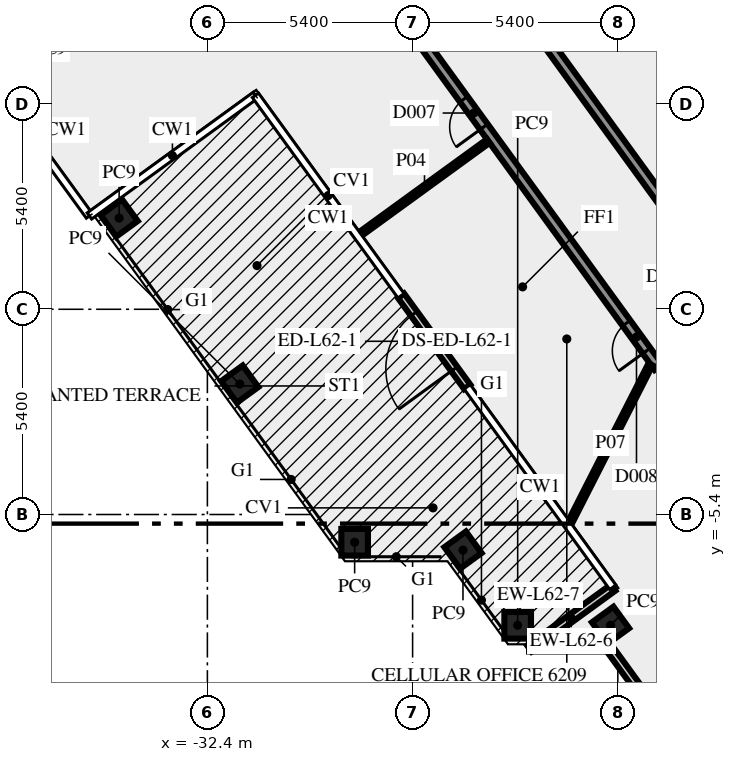
"""IFC4 building model, lengths in metres.
Left out: names, types, materials, properties, quantities, classifications, styles, units other than length and angle.
Written with IfcOpenShell. Run it as: python <this file> out.ifc"""

import sys

from ifc_helpers import new_model, si_unit, direction, frame, frame_2d, origin, origin_2d, place, context, subcontext, project, spatial, rectangle, extrude, element, fill, save


model = new_model("IFC4")
c1 = context("Model", 3, precision=1e-05, world=origin(), true_north=direction((0.0, 1.0)))
c2 = subcontext(c1, "Body", "Model", "MODEL_VIEW")
j1 = project(units=[si_unit("LENGTHUNIT", "METRE"), si_unit("PLANEANGLEUNIT", "RADIAN")], contexts=[c1])
p1 = place(None, origin())
s1 = spatial("IfcSite", under=j1, at=p1, CompositionType="ELEMENT")
p2 = place(p1, origin())
s2 = spatial("IfcBuilding", under=s1, at=p2, CompositionType="ELEMENT")
p3 = place(p2, frame((0.0, 0.0, 265.0)))
s3 = spatial("IfcBuildingStorey", under=s2, at=p3, CompositionType="ELEMENT", Elevation=265.0)
for number, where, z_axis, x_axis in (
    (1, (-34.722, 2.4, 0.0), (0.0, 0.0, 1.0), (0.588, -0.809, 0.0)),
    (2, (-31.548, -1.969, 0.0), (0.0, 0.0, 1.0), (0.588, -0.809, 0.0)),
    (3, (-28.525, -6.13, 0.0), (0.0, 0.0, 1.0), (1.0, 0.0, 0.0)),
    (4, (-25.674, -6.337, 0.0), (0.0, 0.0, 1.0), (0.588, -0.809, 0.0)),
    (5, (-24.235, -8.315, 0.0), (0.0, 0.0, 1.0), (1.0, 0.0, 0.0)),
    (6, (-21.792, -8.315, 0.0), (0.0, 0.0, 1.0), (0.588, -0.809, 0.0)),
):
    element("IfcColumn", number, at=place(p3, frame(where, z_axis=z_axis, x_axis=x_axis)), inside=s3, PredefinedType="COLUMN", context=c2, shape_type="SweptSolid", body=[
        extrude(rectangle(XDim=0.7, YDim=0.7, at=origin_2d()), origin(), (0.0, 0.0, 1.0), 3.65),
    ])
p4 = place(p3, frame((-25.563, -2.041, 0.0), z_axis=(0.0, 0.0, 1.0), x_axis=(-0.587774760134, 0.809024617271, 0.0)))
e7 = element("IfcWall", 7, at=p4, inside=s3, PredefinedType="SOLIDWALL", context=c2, shape_type="SweptSolid", body=[
    extrude(rectangle(XDim=2.963, YDim=0.2, at=frame_2d((1.481, 0.0))), origin(), (0.0, 0.0, 1.0), 3.65),
])
p5 = place(p4, frame((0.582, 0.0, 0.0)))
e8 = element("IfcOpeningElement", 8, at=p5, cuts=e7, PredefinedType="OPENING", context=c2, shape_type="SweptSolid", body=[
    extrude(rectangle(XDim=1.8, YDim=2.4, at=frame_2d((0.9, 1.2))), frame((0.0, 0.11, 0.0), z_axis=(0.0, -1.0, 0.0), x_axis=(1.0, 0.0, 0.0)), (0.0, 0.0, 1.0), 0.22),
])
p6 = place(p3, frame((-21.724, -7.324, 0.0), z_axis=(0.0, 0.0, 1.0), x_axis=(-0.809038277723, -0.587755957162, 0.0)))
e9 = element("IfcWall", 9, at=p6, inside=s3, PredefinedType="SOLIDWALL", context=c2, shape_type="SweptSolid", body=[
    extrude(rectangle(XDim=2.724, YDim=0.2, at=frame_2d((1.362, 0.0))), origin(), (0.0, 0.0, 1.0), 3.65),
])
p7 = place(p3, frame((-23.935, -8.904, 0.0), z_axis=(0.0, 0.0, 1.0), x_axis=(1.0, 0.0, 0.0)))
e10 = element("IfcWall", 10, at=p7, inside=s3, PredefinedType="SOLIDWALL", context=c2, shape_type="SweptSolid", body=[
    extrude(rectangle(XDim=2.092, YDim=0.2, at=frame_2d((1.046, 0.0))), origin(), (0.0, 0.0, 1.0), 3.65),
])
p8 = place(p3, frame((-21.833, -8.909, 0.0), z_axis=(0.0, 0.0, 1.0), x_axis=(0.587766567315, -0.809030569476, 0.0)))
e11 = element("IfcWall", 11, at=p8, inside=s3, PredefinedType="SOLIDWALL", context=c2, shape_type="SweptSolid", body=[
    extrude(rectangle(XDim=2.688, YDim=0.2, at=frame_2d((1.344, 0.0))), origin(), (0.0, 0.0, 1.0), 3.65),
])
p9 = place(p3, frame((-20.531, -1.523, 0.0), z_axis=(0.0, 0.0, 1.0), x_axis=(-0.587786711753, 0.809015934013, 0.0)))
e12 = element("IfcWall", 12, at=p9, inside=s3, PredefinedType="SOLIDWALL", context=c2, shape_type="SweptSolid", body=[
    extrude(rectangle(XDim=21.911, YDim=0.25, at=frame_2d((10.956, 0.0))), origin(), (0.0, 0.0, 1.0), 3.65),
])
p10 = place(p9, frame((0.533, 0.0, 0.0)))
e13 = element("IfcOpeningElement", 13, at=p10, cuts=e12, PredefinedType="OPENING", context=c2, shape_type="SweptSolid", body=[
    extrude(rectangle(XDim=0.9, YDim=2.1, at=frame_2d((0.45, 1.05))), frame((0.0, 0.135, 0.0), z_axis=(0.0, -1.0, 0.0), x_axis=(1.0, 0.0, 0.0)), (0.0, 0.0, 1.0), 0.27),
])
p11 = place(p9, frame((7.816, 0.0, 0.0)))
e14 = element("IfcOpeningElement", 14, at=p11, cuts=e12, PredefinedType="OPENING", context=c2, shape_type="SweptSolid", body=[
    extrude(rectangle(XDim=0.9, YDim=2.1, at=frame_2d((0.45, 1.05))), frame((0.0, 0.135, 0.0), z_axis=(0.0, -1.0, 0.0), x_axis=(1.0, 0.0, 0.0)), (0.0, 0.0, 1.0), 0.27),
])
p12 = place(p3, frame((-31.267, 17.762, 0.0), z_axis=(0.0, 0.0, 1.0), x_axis=(0.587787966774, -0.809015022181, 0.0)))
e15 = element("IfcWall", 15, at=p12, inside=s3, PredefinedType="SOLIDWALL", context=c2, shape_type="SweptSolid", body=[
    extrude(rectangle(XDim=23.345, YDim=0.25, at=frame_2d((11.672, 0.0))), origin(), (0.0, 0.0, 1.0), 3.65),
])
p13 = place(p12, frame((19.004, 0.0, 0.0)))
e16 = element("IfcOpeningElement", 16, at=p13, cuts=e15, PredefinedType="OPENING", context=c2, shape_type="SweptSolid", body=[
    extrude(rectangle(XDim=0.9, YDim=2.1, at=frame_2d((0.45, 1.05))), frame((0.0, 0.135, 0.0), z_axis=(0.0, -1.0, 0.0), x_axis=(1.0, 0.0, 0.0)), (0.0, 0.0, 1.0), 0.27),
])
p14 = place(p3, frame((-25.008, 4.427, 0.0), z_axis=(0.0, 0.0, 1.0), x_axis=(-0.809020893444, -0.587779885646, 0.0)))
e17 = element("IfcWall", 17, at=p14, inside=s3, PredefinedType="PARTITIONING", context=c2, shape_type="SweptSolid", body=[
    extrude(rectangle(XDim=4.15, YDim=0.12, at=frame_2d((2.075, 0.0))), origin(), (0.0, 0.0, 1.0), 3.65),
])
p15 = place(p3, frame((-22.84, -5.574, 0.0), z_axis=(0.0, 0.0, 1.0), x_axis=(0.453931312426, 0.891036679155, 0.0)))
e18 = element("IfcWall", 18, at=p15, inside=s3, PredefinedType="PARTITIONING", context=c2, shape_type="SweptSolid", body=[
    extrude(rectangle(XDim=4.629, YDim=0.12, at=frame_2d((2.314, 0.0))), origin(), (0.0, 0.0, 1.0), 3.65),
])
p16 = place(p5, origin())
e19 = element("IfcDoor", 19, at=p16, inside=s3, OperationType="DOUBLE_DOOR_SINGLE_SWING", PredefinedType="DOOR", context=c2, shape_type="SweptSolid", body=[
    extrude(rectangle(XDim=1.8, YDim=2.4, at=frame_2d((0.9, 1.2))), frame((0.0, 0.025, 0.0), z_axis=(0.0, -1.0, 0.0), x_axis=(1.0, 0.0, 0.0)), (0.0, 0.0, 1.0), 0.05),
])
fill(e8, e19)
p17 = place(p10, origin())
e20 = element("IfcDoor", 20, at=p17, inside=s3, OperationType="SINGLE_SWING_LEFT", PredefinedType="DOOR", context=c2, shape_type="SweptSolid", body=[
    extrude(rectangle(XDim=0.9, YDim=2.1, at=frame_2d((0.45, 1.05))), frame((0.0, 0.025, 0.0), z_axis=(0.0, -1.0, 0.0), x_axis=(1.0, 0.0, 0.0)), (0.0, 0.0, 1.0), 0.05),
])
fill(e13, e20)
p18 = place(p11, origin())
e21 = element("IfcDoor", 21, at=p18, inside=s3, OperationType="SINGLE_SWING_LEFT", PredefinedType="DOOR", context=c2, shape_type="SweptSolid", body=[
    extrude(rectangle(XDim=0.9, YDim=2.1, at=frame_2d((0.45, 1.05))), frame((0.0, 0.025, 0.0), z_axis=(0.0, -1.0, 0.0), x_axis=(1.0, 0.0, 0.0)), (0.0, 0.0, 1.0), 0.05),
])
fill(e14, e21)
save(model, sys.argv[1])
